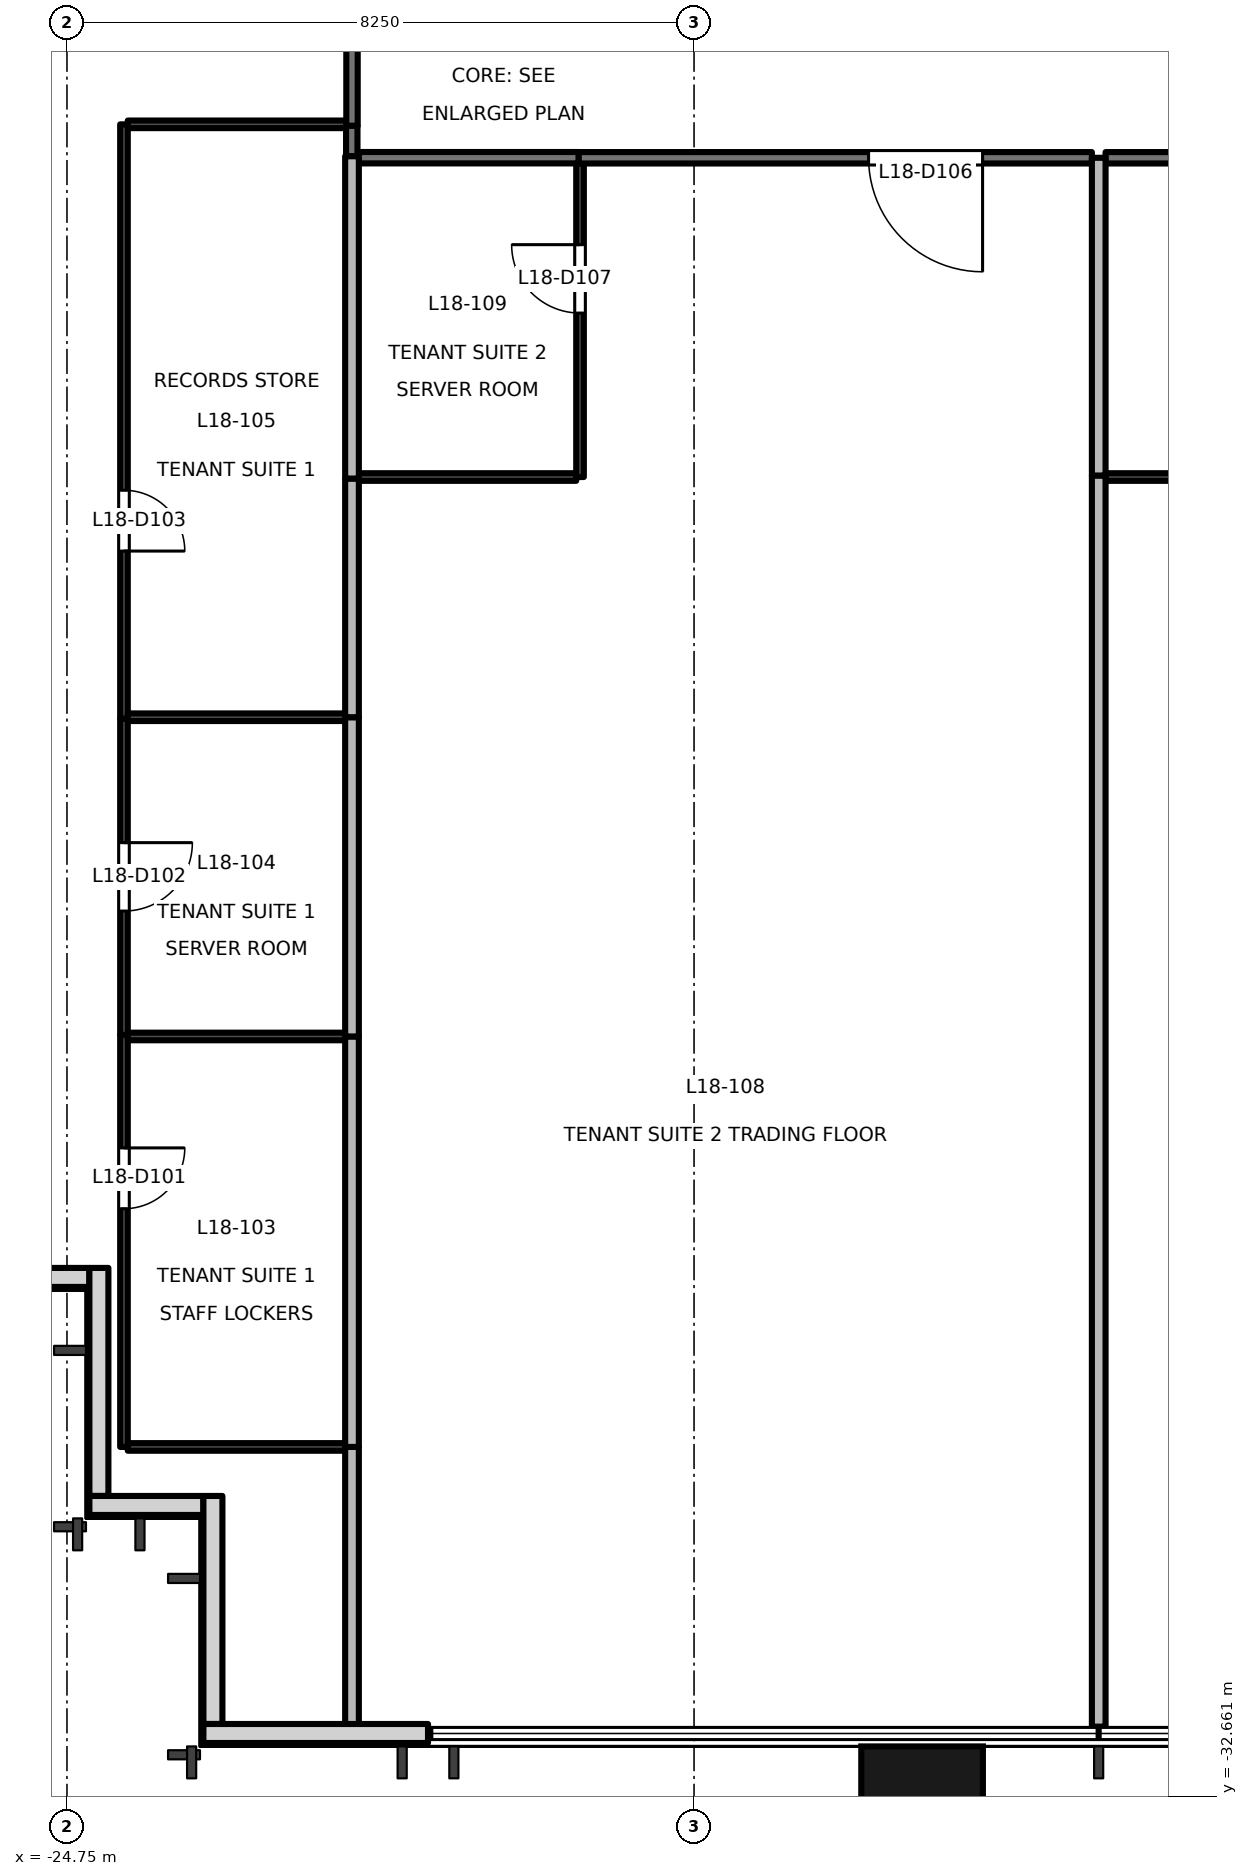
"""IFC4 building model, lengths in metres.
Left out: names, types, materials, properties, quantities, classifications, styles, units other than length and angle.
Written with IfcOpenShell. Run it as: python <this file> out.ifc"""

import sys

from ifc_helpers import new_model, si_unit, direction, frame, frame_2d, origin, origin_2d, place, context, subcontext, project, spatial, rectangle, extrude, element, fill, save


model = new_model("IFC4")
c1 = context("Model", 3, precision=1e-05, world=origin(), true_north=direction((0.0, 1.0)))
c2 = subcontext(c1, "Body", "Model", "MODEL_VIEW")
j1 = project(units=[si_unit("LENGTHUNIT", "METRE"), si_unit("PLANEANGLEUNIT", "RADIAN")], contexts=[c1])
p1 = place(None, origin())
s1 = spatial("IfcSite", under=j1, at=p1, CompositionType="ELEMENT")
p2 = place(p1, origin())
s2 = spatial("IfcBuilding", under=s1, at=p2, CompositionType="ELEMENT")
p3 = place(p2, frame((0.0, 0.0, 83.7)))
s3 = spatial("IfcBuildingStorey", under=s2, at=p3, CompositionType="ELEMENT", Elevation=83.7)
p4 = place(p3, frame((-13.5, -32.9, -0.2), z_axis=(0.0, 0.0, 1.0), x_axis=(1.0, 0.0, 0.0)))
e1 = element("IfcColumn", 1, at=p4, inside=s3, PredefinedType="COLUMN", context=c2, shape_type="SweptSolid", body=[
    extrude(rectangle(XDim=1.6, YDim=1.8, at=origin_2d()), origin(), (0.0, 0.0, 1.0), 4.0),
])
p5 = place(p3, frame((-25.91, -25.83, 0.0), z_axis=(0.0, 0.0, 1.0), x_axis=(1.0, 0.0, 0.0)))
e2 = element("IfcWall", 2, at=p5, inside=s3, PredefinedType="SOLIDWALL", context=c2, shape_type="SweptSolid", body=[
    extrude(rectangle(XDim=1.455, YDim=0.25, at=frame_2d((0.728, 0.0))), origin(), (0.0, 0.0, 1.0), 3.8),
])
p6 = place(p3, frame((-24.33, -25.705, 0.0), z_axis=(0.0, 0.0, 1.0), x_axis=(0.0, -1.0, 0.0)))
e3 = element("IfcWall", 3, at=p6, inside=s3, PredefinedType="SOLIDWALL", context=c2, shape_type="SweptSolid", body=[
    extrude(rectangle(XDim=3.0, YDim=0.25, at=frame_2d((1.5, 0.0))), origin(), (0.0, 0.0, 1.0), 3.8),
])
p7 = place(p3, frame((-24.455, -28.83, 0.0), z_axis=(0.0, 0.0, 1.0), x_axis=(1.0, 0.0, 0.0)))
e4 = element("IfcWall", 4, at=p7, inside=s3, PredefinedType="SOLIDWALL", context=c2, shape_type="SweptSolid", body=[
    extrude(rectangle(XDim=1.5, YDim=0.25, at=frame_2d((0.75, 0.0))), origin(), (0.0, 0.0, 1.0), 3.8),
])
p8 = place(p3, frame((-22.83, -28.705, 0.0), z_axis=(0.0, 0.0, 1.0), x_axis=(0.0, -1.0, 0.0)))
e5 = element("IfcWall", 5, at=p8, inside=s3, PredefinedType="SOLIDWALL", context=c2, shape_type="SweptSolid", body=[
    extrude(rectangle(XDim=3.0, YDim=0.25, at=frame_2d((1.5, 0.0))), origin(), (0.0, 0.0, 1.0), 3.8),
])
p9 = place(p3, frame((-22.955, -31.83, 0.0), z_axis=(0.0, 0.0, 1.0), x_axis=(1.0, 0.0, 0.0)))
e6 = element("IfcWall", 6, at=p9, inside=s3, PredefinedType="SOLIDWALL", context=c2, shape_type="SweptSolid", body=[
    extrude(rectangle(XDim=2.955, YDim=0.25, at=frame_2d((1.478, 0.0))), origin(), (0.0, 0.0, 1.0), 3.8),
])
p10 = place(p3, frame((-21.0, -10.68, 0.0), z_axis=(0.0, 0.0, 1.0), x_axis=(0.0, 1.0, 0.0)))
e7 = element("IfcWall", 7, at=p10, inside=s3, PredefinedType="PARTITIONING", context=c2, shape_type="SweptSolid", body=[
    extrude(rectangle(XDim=6.0, YDim=0.15, at=frame_2d((3.0, 0.0))), origin(), (0.0, 0.0, 1.0), 3.8),
])
p11 = place(p10, frame((3.7, 0.0, 0.0)))
e8 = element("IfcOpeningElement", 8, at=p11, cuts=e7, PredefinedType="OPENING", context=c2, shape_type="SweptSolid", body=[
    extrude(rectangle(XDim=0.9, YDim=2.1, at=frame_2d((0.45, 1.05))), frame((0.0, 0.085, 0.0), z_axis=(0.0, -1.0, 0.0), x_axis=(1.0, 0.0, 0.0)), (0.0, 0.0, 1.0), 0.171),
])
p12 = place(p3, frame((-21.003, -11.08, 0.0), z_axis=(0.0, 0.0, 1.0), x_axis=(0.0, 1.0, 0.0)))
e9 = element("IfcWall", 9, at=p12, inside=s3, PredefinedType="PARTITIONING", context=c2, shape_type="SweptSolid", body=[
    extrude(rectangle(XDim=0.4, YDim=0.15, at=frame_2d((0.2, 0.0))), origin(), (0.0, 0.0, 1.0), 3.8),
])
p13 = place(p3, frame((-11.266, -11.1, 0.0), z_axis=(0.0, 0.0, 1.0), x_axis=(-1.0, 0.0, 0.0)))
e10 = element("IfcWall", 10, at=p13, inside=s3, PredefinedType="PARTITIONING", context=c2, shape_type="SweptSolid", body=[
    extrude(rectangle(XDim=6.754, YDim=0.15, at=frame_2d((3.377, 0.0))), origin(), (0.0, 0.0, 1.0), 2.8),
])
p14 = place(p13, frame((1.438, 0.0, 0.0)))
e11 = element("IfcOpeningElement", 11, at=p14, cuts=e10, PredefinedType="OPENING", context=c2, shape_type="SweptSolid", body=[
    extrude(rectangle(XDim=1.5, YDim=2.1, at=frame_2d((0.75, 1.05))), frame((0.0, 0.085, 0.0), z_axis=(0.0, -1.0, 0.0), x_axis=(1.0, 0.0, 0.0)), (0.0, 0.0, 1.0), 0.171),
])
p15 = place(p3, frame((-18.02, -11.099, 0.0), z_axis=(0.0, 0.0, 1.0), x_axis=(-1.0, 0.0, 0.0)))
e12 = element("IfcWall", 12, at=p15, inside=s3, PredefinedType="PARTITIONING", context=c2, shape_type="SweptSolid", body=[
    extrude(rectangle(XDim=2.89, YDim=0.15, at=frame_2d((1.445, 0.0))), origin(), (0.0, 0.0, 1.0), 3.8),
])
p16 = place(p3, frame((-5.156, -11.1, 0.0), z_axis=(0.0, 0.0, 1.0), x_axis=(-1.0, 0.0, 0.0)))
e13 = element("IfcWall", 13, at=p16, inside=s3, PredefinedType="PARTITIONING", context=c2, shape_type="SweptSolid", body=[
    extrude(rectangle(XDim=5.93, YDim=0.15, at=frame_2d((2.965, 0.0))), origin(), (0.0, 0.0, 1.0), 2.8),
])
p17 = place(p3, frame((-24.0, -22.64, 0.0), z_axis=(0.0, 0.0, 1.0), x_axis=(0.0, -1.0, 0.0)))
e14 = element("IfcWall", 14, at=p17, inside=s3, PredefinedType="PARTITIONING", context=c2, shape_type="SweptSolid", body=[
    extrude(rectangle(XDim=5.42, YDim=0.1, at=frame_2d((2.71, 0.0))), origin(), (0.0, 0.0, 1.0), 3.8),
])
p18 = place(p17, frame((1.486, 0.0, 0.0)))
e15 = element("IfcOpeningElement", 15, at=p18, cuts=e14, PredefinedType="OPENING", context=c2, shape_type="SweptSolid", body=[
    extrude(rectangle(XDim=0.8, YDim=2.1, at=frame_2d((0.4, 1.05))), frame((0.0, 0.061, 0.0), z_axis=(0.0, -1.0, 0.0), x_axis=(1.0, 0.0, 0.0)), (0.0, 0.0, 1.0), 0.121),
])
p19 = place(p3, frame((-23.95, -28.06, 0.0), z_axis=(0.0, 0.0, 1.0), x_axis=(1.0, 0.0, 0.0)))
e16 = element("IfcWall", 16, at=p19, inside=s3, PredefinedType="PARTITIONING", context=c2, shape_type="SweptSolid", body=[
    extrude(rectangle(XDim=2.86, YDim=0.1, at=frame_2d((1.43, 0.0))), origin(), (0.0, 0.0, 1.0), 3.8),
])
p20 = place(p3, frame((-24.0, -18.48, 0.0), z_axis=(0.0, 0.0, 1.0), x_axis=(0.0, -1.0, 0.0)))
e17 = element("IfcWall", 17, at=p20, inside=s3, PredefinedType="PARTITIONING", context=c2, shape_type="SweptSolid", body=[
    extrude(rectangle(XDim=4.16, YDim=0.1, at=frame_2d((2.08, 0.0))), origin(), (0.0, 0.0, 1.0), 3.8),
])
p21 = place(p20, frame((1.63, 0.0, 0.0)))
e18 = element("IfcOpeningElement", 18, at=p21, cuts=e17, PredefinedType="OPENING", context=c2, shape_type="SweptSolid", body=[
    extrude(rectangle(XDim=0.9, YDim=2.1, at=frame_2d((0.45, 1.05))), frame((0.0, 0.061, 0.0), z_axis=(0.0, -1.0, 0.0), x_axis=(1.0, 0.0, 0.0)), (0.0, 0.0, 1.0), 0.121),
])
p22 = place(p3, frame((-24.0, -10.66, 0.0), z_axis=(0.0, 0.0, 1.0), x_axis=(0.0, -1.0, 0.0)))
e19 = element("IfcWall", 19, at=p22, inside=s3, PredefinedType="PARTITIONING", context=c2, shape_type="SweptSolid", body=[
    extrude(rectangle(XDim=7.82, YDim=0.1, at=frame_2d((3.91, 0.0))), origin(), (0.0, 0.0, 1.0), 3.8),
])
p23 = place(p22, frame((4.814, 0.0, 0.0)))
e20 = element("IfcOpeningElement", 20, at=p23, cuts=e19, PredefinedType="OPENING", context=c2, shape_type="SweptSolid", body=[
    extrude(rectangle(XDim=0.8, YDim=2.1, at=frame_2d((0.4, 1.05))), frame((0.0, 0.061, 0.0), z_axis=(0.0, -1.0, 0.0), x_axis=(1.0, 0.0, 0.0)), (0.0, 0.0, 1.0), 0.121),
])
p24 = place(p3, frame((-21.075, -10.66, 0.0), z_axis=(0.0, 0.0, 1.0), x_axis=(-1.0, 0.0, 0.0)))
e21 = element("IfcWall", 21, at=p24, inside=s3, PredefinedType="PARTITIONING", context=c2, shape_type="SweptSolid", body=[
    extrude(rectangle(XDim=2.875, YDim=0.1, at=frame_2d((1.438, 0.0))), origin(), (0.0, 0.0, 1.0), 3.8),
])
p25 = place(p3, frame((-21.0, -28.06, 0.0), z_axis=(0.0, 0.0, 1.0), x_axis=(0.0, -1.0, 0.0)))
e22 = element("IfcWall", 22, at=p25, inside=s3, PredefinedType="PARTITIONING", context=c2, shape_type="SweptSolid", body=[
    extrude(rectangle(XDim=3.68, YDim=0.18, at=frame_2d((1.84, 0.0))), origin(), (0.0, 0.0, 1.0), 3.8),
])
p26 = place(p3, frame((-23.95, -22.66, 0.0), z_axis=(0.0, 0.0, 1.0), x_axis=(1.0, 0.0, 0.0)))
e23 = element("IfcWall", 23, at=p26, inside=s3, PredefinedType="PARTITIONING", context=c2, shape_type="SweptSolid", body=[
    extrude(rectangle(XDim=2.86, YDim=0.1, at=frame_2d((1.43, 0.0))), origin(), (0.0, 0.0, 1.0), 3.8),
])
p27 = place(p3, frame((-21.0, -22.66, 0.0), z_axis=(0.0, 0.0, 1.0), x_axis=(0.0, -1.0, 0.0)))
e24 = element("IfcWall", 24, at=p27, inside=s3, PredefinedType="PARTITIONING", context=c2, shape_type="SweptSolid", body=[
    extrude(rectangle(XDim=5.4, YDim=0.18, at=frame_2d((2.7, 0.0))), origin(), (0.0, 0.0, 1.0), 3.8),
])
p28 = place(p3, frame((-23.95, -18.46, 0.0), z_axis=(0.0, 0.0, 1.0), x_axis=(1.0, 0.0, 0.0)))
e25 = element("IfcWall", 25, at=p28, inside=s3, PredefinedType="PARTITIONING", context=c2, shape_type="SweptSolid", body=[
    extrude(rectangle(XDim=2.86, YDim=0.1, at=frame_2d((1.43, 0.0))), origin(), (0.0, 0.0, 1.0), 3.8),
])
p29 = place(p3, frame((-21.0, -18.46, 0.0), z_axis=(0.0, 0.0, 1.0), x_axis=(0.0, -1.0, 0.0)))
e26 = element("IfcWall", 26, at=p29, inside=s3, PredefinedType="PARTITIONING", context=c2, shape_type="SweptSolid", body=[
    extrude(rectangle(XDim=4.2, YDim=0.18, at=frame_2d((2.1, 0.0))), origin(), (0.0, 0.0, 1.0), 3.8),
])
p30 = place(p3, frame((-21.0, -15.32, 0.0), z_axis=(0.0, 0.0, 1.0), x_axis=(0.0, -1.0, 0.0)))
e27 = element("IfcWall", 27, at=p30, inside=s3, PredefinedType="PARTITIONING", context=c2, shape_type="SweptSolid", body=[
    extrude(rectangle(XDim=3.14, YDim=0.18, at=frame_2d((1.57, 0.0))), origin(), (0.0, 0.0, 1.0), 3.8),
])
p31 = place(p3, frame((-21.0, -11.08, 0.0), z_axis=(0.0, 0.0, 1.0), x_axis=(0.0, -1.0, 0.0)))
e28 = element("IfcWall", 28, at=p31, inside=s3, PredefinedType="PARTITIONING", context=c2, shape_type="SweptSolid", body=[
    extrude(rectangle(XDim=4.24, YDim=0.18, at=frame_2d((2.12, 0.0))), origin(), (0.0, 0.0, 1.0), 3.8),
])
p32 = place(p3, frame((-20.91, -15.3, 0.0), z_axis=(0.0, 0.0, 1.0), x_axis=(1.0, 0.0, 0.0)))
e29 = element("IfcWall", 29, at=p32, inside=s3, PredefinedType="PARTITIONING", context=c2, shape_type="SweptSolid", body=[
    extrude(rectangle(XDim=2.86, YDim=0.1, at=frame_2d((1.43, 0.0))), origin(), (0.0, 0.0, 1.0), 3.8),
])
p33 = place(p3, frame((-18.0, -15.3, 0.0), z_axis=(0.0, 0.0, 1.0), x_axis=(0.0, 1.0, 0.0)))
e30 = element("IfcWall", 30, at=p33, inside=s3, PredefinedType="PARTITIONING", context=c2, shape_type="SweptSolid", body=[
    extrude(rectangle(XDim=4.125, YDim=0.1, at=frame_2d((2.062, 0.0))), origin(), (0.0, 0.0, 1.0), 3.8),
])
p34 = place(p33, frame((2.157, 0.0, 0.0)))
e31 = element("IfcOpeningElement", 31, at=p34, cuts=e30, PredefinedType="OPENING", context=c2, shape_type="SweptSolid", body=[
    extrude(rectangle(XDim=0.9, YDim=2.1, at=frame_2d((0.45, 1.05))), frame((0.0, 0.061, 0.0), z_axis=(0.0, -1.0, 0.0), x_axis=(1.0, 0.0, 0.0)), (0.0, 0.0, 1.0), 0.121),
])
p35 = place(p3, frame((-11.176, -15.28, 0.0), z_axis=(0.0, 0.0, 1.0), x_axis=(0.0, -1.0, 0.0)))
e32 = element("IfcWall", 32, at=p35, inside=s3, PredefinedType="PARTITIONING", context=c2, shape_type="SweptSolid", body=[
    extrude(rectangle(XDim=16.46, YDim=0.18, at=frame_2d((8.23, 0.0))), origin(), (0.0, 0.0, 1.0), 3.8),
])
p36 = place(p3, frame((-11.176, -11.1, 0.0), z_axis=(0.0, 0.0, 1.0), x_axis=(0.0, -1.0, 0.0)))
e33 = element("IfcWall", 33, at=p36, inside=s3, PredefinedType="PARTITIONING", context=c2, shape_type="SweptSolid", body=[
    extrude(rectangle(XDim=4.18, YDim=0.18, at=frame_2d((2.09, 0.0))), origin(), (0.0, 0.0, 1.0), 3.8),
])
p37 = place(p3, frame((-11.086, -15.3, 0.0), z_axis=(0.0, 0.0, 1.0), x_axis=(1.0, 0.0, 0.0)))
e34 = element("IfcWall", 34, at=p37, inside=s3, PredefinedType="PARTITIONING", context=c2, shape_type="SweptSolid", body=[
    extrude(rectangle(XDim=5.91, YDim=0.1, at=frame_2d((2.955, 0.0))), origin(), (0.0, 0.0, 1.0), 2.8),
])
p38 = place(p37, frame((1.633, 0.0, 0.0)))
e35 = element("IfcOpeningElement", 35, at=p38, cuts=e34, PredefinedType="OPENING", context=c2, shape_type="SweptSolid", body=[
    extrude(rectangle(XDim=0.8, YDim=2.1, at=frame_2d((0.4, 1.05))), frame((0.0, 0.061, 0.0), z_axis=(0.0, -1.0, 0.0), x_axis=(1.0, 0.0, 0.0)), (0.0, 0.0, 1.0), 0.121),
])
p39 = place(p18, origin())
e36 = element("IfcDoor", 36, at=p39, inside=s3, OperationType="SINGLE_SWING_LEFT", PredefinedType="DOOR", context=c2, shape_type="SweptSolid", body=[
    extrude(rectangle(XDim=0.8, YDim=2.1, at=frame_2d((0.4, 1.05))), frame((0.0, 0.025, 0.0), z_axis=(0.0, -1.0, 0.0), x_axis=(1.0, 0.0, 0.0)), (0.0, 0.0, 1.0), 0.05),
])
fill(e15, e36)
p40 = place(p21, origin())
e37 = element("IfcDoor", 37, at=p40, inside=s3, OperationType="SINGLE_SWING_LEFT", PredefinedType="DOOR", context=c2, shape_type="SweptSolid", body=[
    extrude(rectangle(XDim=0.9, YDim=2.1, at=frame_2d((0.45, 1.05))), frame((0.0, 0.025, 0.0), z_axis=(0.0, -1.0, 0.0), x_axis=(1.0, 0.0, 0.0)), (0.0, 0.0, 1.0), 0.05),
])
fill(e18, e37)
p41 = place(p23, origin())
e38 = element("IfcDoor", 38, at=p41, inside=s3, OperationType="SINGLE_SWING_RIGHT", PredefinedType="DOOR", context=c2, shape_type="SweptSolid", body=[
    extrude(rectangle(XDim=0.8, YDim=2.1, at=frame_2d((0.4, 1.05))), frame((0.0, 0.025, 0.0), z_axis=(0.0, -1.0, 0.0), x_axis=(1.0, 0.0, 0.0)), (0.0, 0.0, 1.0), 0.05),
])
fill(e20, e38)
p42 = place(p14, origin())
e39 = element("IfcDoor", 39, at=p42, inside=s3, OperationType="DOUBLE_DOOR_SINGLE_SWING", PredefinedType="DOOR", context=c2, shape_type="SweptSolid", body=[
    extrude(rectangle(XDim=1.5, YDim=2.1, at=frame_2d((0.75, 1.05))), frame((0.0, 0.025, 0.0), z_axis=(0.0, -1.0, 0.0), x_axis=(1.0, 0.0, 0.0)), (0.0, 0.0, 1.0), 0.05),
])
fill(e11, e39)
p43 = place(p34, origin())
e40 = element("IfcDoor", 40, at=p43, inside=s3, OperationType="SINGLE_SWING_RIGHT", PredefinedType="DOOR", context=c2, shape_type="SweptSolid", body=[
    extrude(rectangle(XDim=0.9, YDim=2.1, at=frame_2d((0.45, 1.05))), frame((0.0, 0.025, 0.0), z_axis=(0.0, -1.0, 0.0), x_axis=(1.0, 0.0, 0.0)), (0.0, 0.0, 1.0), 0.05),
])
fill(e31, e40)
save(model, sys.argv[1])
